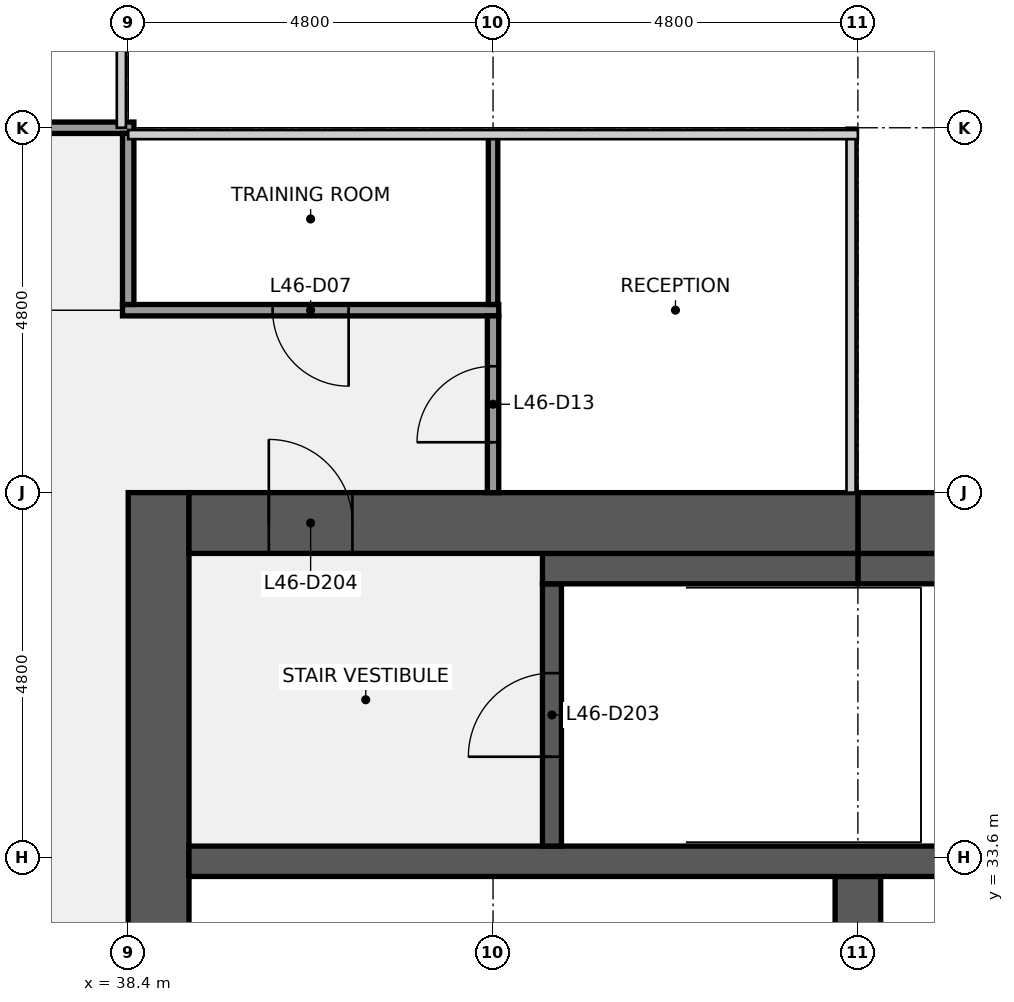
"""IFC4 building model, lengths in metres.
Left out: names, types, materials, properties, quantities, classifications, styles, units other than length and angle.
Written with IfcOpenShell. Run it as: python <this file> out.ifc"""

import sys

from ifc_helpers import new_model, si_unit, direction, frame, frame_2d, origin, place, context, subcontext, project, spatial, rectangle, extrude, element, fill, save


model = new_model("IFC4")
c1 = context("Model", 3, precision=1e-05, world=origin(), true_north=direction((0.0, 1.0)))
c2 = subcontext(c1, "Body", "Model", "MODEL_VIEW")
j1 = project(units=[si_unit("LENGTHUNIT", "METRE"), si_unit("PLANEANGLEUNIT", "RADIAN")], contexts=[c1])
p1 = place(None, origin())
s1 = spatial("IfcSite", under=j1, at=p1, CompositionType="ELEMENT")
p2 = place(p1, origin())
s2 = spatial("IfcBuilding", under=s1, at=p2, CompositionType="ELEMENT")
p3 = place(p2, frame((0.0, 0.0, 213.2)))
s3 = spatial("IfcBuildingStorey", under=s2, at=p3, CompositionType="ELEMENT", Elevation=213.2)
p4 = place(p3, frame((38.8, 9.6, 0.0), z_axis=(0.0, 0.0, 1.0), x_axis=(0.0, 1.0, 0.0)))
e1 = element("IfcWall", 1, at=p4, inside=s3, PredefinedType="SHEAR", context=c2, shape_type="SweptSolid", body=[
    extrude(rectangle(XDim=28.8, YDim=0.8, at=frame_2d((14.4, 0.0))), origin(), (0.0, 0.0, 1.0), 3.84),
])
p5 = place(p4, frame((8.7, 0.0, 0.0)))
e2 = element("IfcOpeningElement", 2, at=p5, cuts=e1, PredefinedType="OPENING", context=c2, shape_type="SweptSolid", body=[
    extrude(rectangle(XDim=1.8, YDim=2.1, at=frame_2d((0.9, 1.05))), frame((0.0, 0.41, 0.0), z_axis=(0.0, -1.0, 0.0), x_axis=(1.0, 0.0, 0.0)), (0.0, 0.0, 1.0), 0.82),
])
p6 = place(p4, frame((18.3, 0.0, 0.0)))
e3 = element("IfcOpeningElement", 3, at=p6, cuts=e1, PredefinedType="OPENING", context=c2, shape_type="SweptSolid", body=[
    extrude(rectangle(XDim=1.8, YDim=2.1, at=frame_2d((0.9, 1.05))), frame((0.0, 0.41, 0.0), z_axis=(0.0, -1.0, 0.0), x_axis=(1.0, 0.0, 0.0)), (0.0, 0.0, 1.0), 0.82),
])
p7 = place(p3, frame((48.0, 30.75, 0.0), z_axis=(0.0, 0.0, 1.0), x_axis=(0.0, 1.0, 0.0)))
e4 = element("IfcWall", 4, at=p7, inside=s3, PredefinedType="SHEAR", context=c2, shape_type="SweptSolid", body=[
    extrude(rectangle(XDim=2.6, YDim=0.6, at=frame_2d((1.3, 0.0))), origin(), (0.0, 0.0, 1.0), 3.84),
])
p8 = place(p3, frame((39.2, 33.55, 0.0), z_axis=(0.0, 0.0, 1.0), x_axis=(1.0, 0.0, 0.0)))
e5 = element("IfcWall", 5, at=p8, inside=s3, PredefinedType="SHEAR", context=c2, shape_type="SweptSolid", body=[
    extrude(rectangle(XDim=17.6, YDim=0.4, at=frame_2d((8.8, 0.0))), origin(), (0.0, 0.0, 1.0), 3.84),
])
p9 = place(p3, frame((43.975, 33.75, 0.0), z_axis=(0.0, 0.0, 1.0), x_axis=(0.0, 1.0, 0.0)))
e6 = element("IfcWall", 6, at=p9, inside=s3, PredefinedType="SHEAR", context=c2, shape_type="SweptSolid", body=[
    extrude(rectangle(XDim=3.45, YDim=0.25, at=frame_2d((1.725, 0.0))), origin(), (0.0, 0.0, 1.0), 3.84),
])
p10 = place(p9, frame((1.175, 0.0, 0.0)))
e7 = element("IfcOpeningElement", 7, at=p10, cuts=e6, PredefinedType="OPENING", context=c2, shape_type="SweptSolid", body=[
    extrude(rectangle(XDim=1.1, YDim=2.1, at=frame_2d((0.55, 1.05))), frame((0.0, 0.135, 0.0), z_axis=(0.0, -1.0, 0.0), x_axis=(1.0, 0.0, 0.0)), (0.0, 0.0, 1.0), 0.27),
])
p11 = place(p3, frame((48.0, 37.4, 0.0), z_axis=(0.0, 0.0, 1.0), x_axis=(1.0, 0.0, 0.0)))
e8 = element("IfcWall", 8, at=p11, inside=s3, PredefinedType="SHEAR", context=c2, shape_type="SweptSolid", body=[
    extrude(rectangle(XDim=3.35, YDim=0.4, at=frame_2d((1.675, 0.0))), origin(), (0.0, 0.0, 1.0), 3.84),
])
p12 = place(p3, frame((43.85, 37.4, 0.0), z_axis=(0.0, 0.0, 1.0), x_axis=(1.0, 0.0, 0.0)))
e9 = element("IfcWall", 9, at=p12, inside=s3, PredefinedType="SHEAR", context=c2, shape_type="SweptSolid", body=[
    extrude(rectangle(XDim=4.15, YDim=0.4, at=frame_2d((2.075, 0.0))), origin(), (0.0, 0.0, 1.0), 3.84),
])
p13 = place(p3, frame((48.0, 38.0, 0.0), z_axis=(0.0, 0.0, 1.0), x_axis=(1.0, 0.0, 0.0)))
e10 = element("IfcWall", 10, at=p13, inside=s3, PredefinedType="SHEAR", context=c2, shape_type="SweptSolid", body=[
    extrude(rectangle(XDim=8.8, YDim=0.8, at=frame_2d((4.4, 0.0))), origin(), (0.0, 0.0, 1.0), 3.84),
])
p14 = place(p13, frame((1.5, 0.0, 0.9)))
e11 = element("IfcOpeningElement", 11, at=p14, cuts=e10, PredefinedType="OPENING", context=c2, shape_type="SweptSolid", body=[
    extrude(rectangle(XDim=1.8, YDim=1.5, at=frame_2d((0.9, 0.75))), frame((0.0, 0.41, 0.0), z_axis=(0.0, -1.0, 0.0), x_axis=(1.0, 0.0, 0.0)), (0.0, 0.0, 1.0), 0.82),
])
p15 = place(p3, frame((39.2, 38.0, 0.0), z_axis=(0.0, 0.0, 1.0), x_axis=(1.0, 0.0, 0.0)))
e12 = element("IfcWall", 12, at=p15, inside=s3, PredefinedType="SHEAR", context=c2, shape_type="SweptSolid", body=[
    extrude(rectangle(XDim=8.8, YDim=0.8, at=frame_2d((4.4, 0.0))), origin(), (0.0, 0.0, 1.0), 3.84),
])
p16 = place(p15, frame((1.05, 0.0, 0.0)))
e13 = element("IfcOpeningElement", 13, at=p16, cuts=e12, PredefinedType="OPENING", context=c2, shape_type="SweptSolid", body=[
    extrude(rectangle(XDim=1.1, YDim=2.1, at=frame_2d((0.55, 1.05))), frame((0.0, 0.41, 0.0), z_axis=(0.0, -1.0, 0.0), x_axis=(1.0, 0.0, 0.0)), (0.0, 0.0, 1.0), 0.82),
])
p17 = place(p3, frame((38.325, 40.8, 0.0), z_axis=(0.0, 0.0, 1.0), x_axis=(1.0, 0.0, 0.0)))
e14 = element("IfcWall", 14, at=p17, inside=s3, PredefinedType="PARTITIONING", context=c2, shape_type="SweptSolid", body=[
    extrude(rectangle(XDim=4.95, YDim=0.15, at=frame_2d((2.475, 0.0))), origin(), (0.0, 0.0, 1.0), 2.87),
])
p18 = place(p17, frame((1.975, 0.0, 0.0)))
e15 = element("IfcOpeningElement", 15, at=p18, cuts=e14, PredefinedType="OPENING", context=c2, shape_type="SweptSolid", body=[
    extrude(rectangle(XDim=1.0, YDim=2.1, at=frame_2d((0.5, 1.05))), frame((0.0, 0.085, 0.0), z_axis=(0.0, -1.0, 0.0), x_axis=(1.0, 0.0, 0.0)), (0.0, 0.0, 1.0), 0.17),
])
p19 = place(p3, frame((19.125, 43.2, 0.0), z_axis=(0.0, 0.0, 1.0), x_axis=(1.0, 0.0, 0.0)))
e16 = element("IfcWall", 16, at=p19, inside=s3, PredefinedType="PARTITIONING", context=c2, shape_type="SweptSolid", body=[
    extrude(rectangle(XDim=19.35, YDim=0.15, at=frame_2d((9.675, 0.0))), origin(), (0.0, 0.0, 1.0), 2.87),
])
p20 = place(p19, frame((9.175, 0.0, 0.0)))
e17 = element("IfcOpeningElement", 17, at=p20, cuts=e16, PredefinedType="OPENING", context=c2, shape_type="SweptSolid", body=[
    extrude(rectangle(XDim=1.0, YDim=2.1, at=frame_2d((0.5, 1.05))), frame((0.0, 0.085, 0.0), z_axis=(0.0, -1.0, 0.0), x_axis=(1.0, 0.0, 0.0)), (0.0, 0.0, 1.0), 0.17),
])
p21 = place(p3, frame((38.4, 40.875, 0.0), z_axis=(0.0, 0.0, 1.0), x_axis=(0.0, 1.0, 0.0)))
e18 = element("IfcWall", 18, at=p21, inside=s3, PredefinedType="PARTITIONING", context=c2, shape_type="SweptSolid", body=[
    extrude(rectangle(XDim=2.25, YDim=0.15, at=frame_2d((1.125, 0.0))), origin(), (0.0, 0.0, 1.0), 2.87),
])
p22 = place(p3, frame((43.2, 40.875, 0.0), z_axis=(0.0, 0.0, 1.0), x_axis=(0.0, 1.0, 0.0)))
e19 = element("IfcWall", 19, at=p22, inside=s3, PredefinedType="PARTITIONING", context=c2, shape_type="SweptSolid", body=[
    extrude(rectangle(XDim=2.225, YDim=0.125, at=frame_2d((1.113, 0.0))), origin(), (0.0, 0.0, 1.0), 2.87),
])
p23 = place(p3, frame((43.2, 38.4, 0.0), z_axis=(0.0, 0.0, 1.0), x_axis=(0.0, 1.0, 0.0)))
e20 = element("IfcWall", 20, at=p23, inside=s3, PredefinedType="PARTITIONING", context=c2, shape_type="SweptSolid", body=[
    extrude(rectangle(XDim=2.325, YDim=0.15, at=frame_2d((1.163, 0.0))), origin(), (0.0, 0.0, 1.0), 2.87),
])
p24 = place(p23, frame((0.663, 0.0, 0.0)))
e21 = element("IfcOpeningElement", 21, at=p24, cuts=e20, PredefinedType="OPENING", context=c2, shape_type="SweptSolid", body=[
    extrude(rectangle(XDim=1.0, YDim=2.1, at=frame_2d((0.5, 1.05))), frame((0.0, 0.085, 0.0), z_axis=(0.0, -1.0, 0.0), x_axis=(1.0, 0.0, 0.0)), (0.0, 0.0, 1.0), 0.17),
])
p25 = place(p10, origin())
e22 = element("IfcDoor", 22, at=p25, inside=s3, OperationType="SINGLE_SWING_LEFT", PredefinedType="DOOR", context=c2, shape_type="SweptSolid", body=[
    extrude(rectangle(XDim=1.1, YDim=2.1, at=frame_2d((0.55, 1.05))), frame((0.0, 0.025, 0.0), z_axis=(0.0, -1.0, 0.0), x_axis=(1.0, 0.0, 0.0)), (0.0, 0.0, 1.0), 0.05),
])
fill(e7, e22)
p26 = place(p16, origin())
e23 = element("IfcDoor", 23, at=p26, inside=s3, OperationType="SINGLE_SWING_LEFT", PredefinedType="DOOR", context=c2, shape_type="SweptSolid", body=[
    extrude(rectangle(XDim=1.1, YDim=2.1, at=frame_2d((0.55, 1.05))), frame((0.0, 0.025, 0.0), z_axis=(0.0, -1.0, 0.0), x_axis=(1.0, 0.0, 0.0)), (0.0, 0.0, 1.0), 0.05),
])
fill(e13, e23)
p27 = place(p18, origin())
e24 = element("IfcDoor", 24, at=p27, inside=s3, OperationType="SINGLE_SWING_RIGHT", PredefinedType="DOOR", context=c2, shape_type="SweptSolid", body=[
    extrude(rectangle(XDim=1.0, YDim=2.1, at=frame_2d((0.5, 1.05))), frame((0.0, 0.025, 0.0), z_axis=(0.0, -1.0, 0.0), x_axis=(1.0, 0.0, 0.0)), (0.0, 0.0, 1.0), 0.05),
])
fill(e15, e24)
p28 = place(p24, origin())
e25 = element("IfcDoor", 25, at=p28, inside=s3, OperationType="SINGLE_SWING_LEFT", PredefinedType="DOOR", context=c2, shape_type="SweptSolid", body=[
    extrude(rectangle(XDim=1.0, YDim=2.1, at=frame_2d((0.5, 1.05))), frame((0.0, 0.025, 0.0), z_axis=(0.0, -1.0, 0.0), x_axis=(1.0, 0.0, 0.0)), (0.0, 0.0, 1.0), 0.05),
])
fill(e21, e25)
save(model, sys.argv[1])
